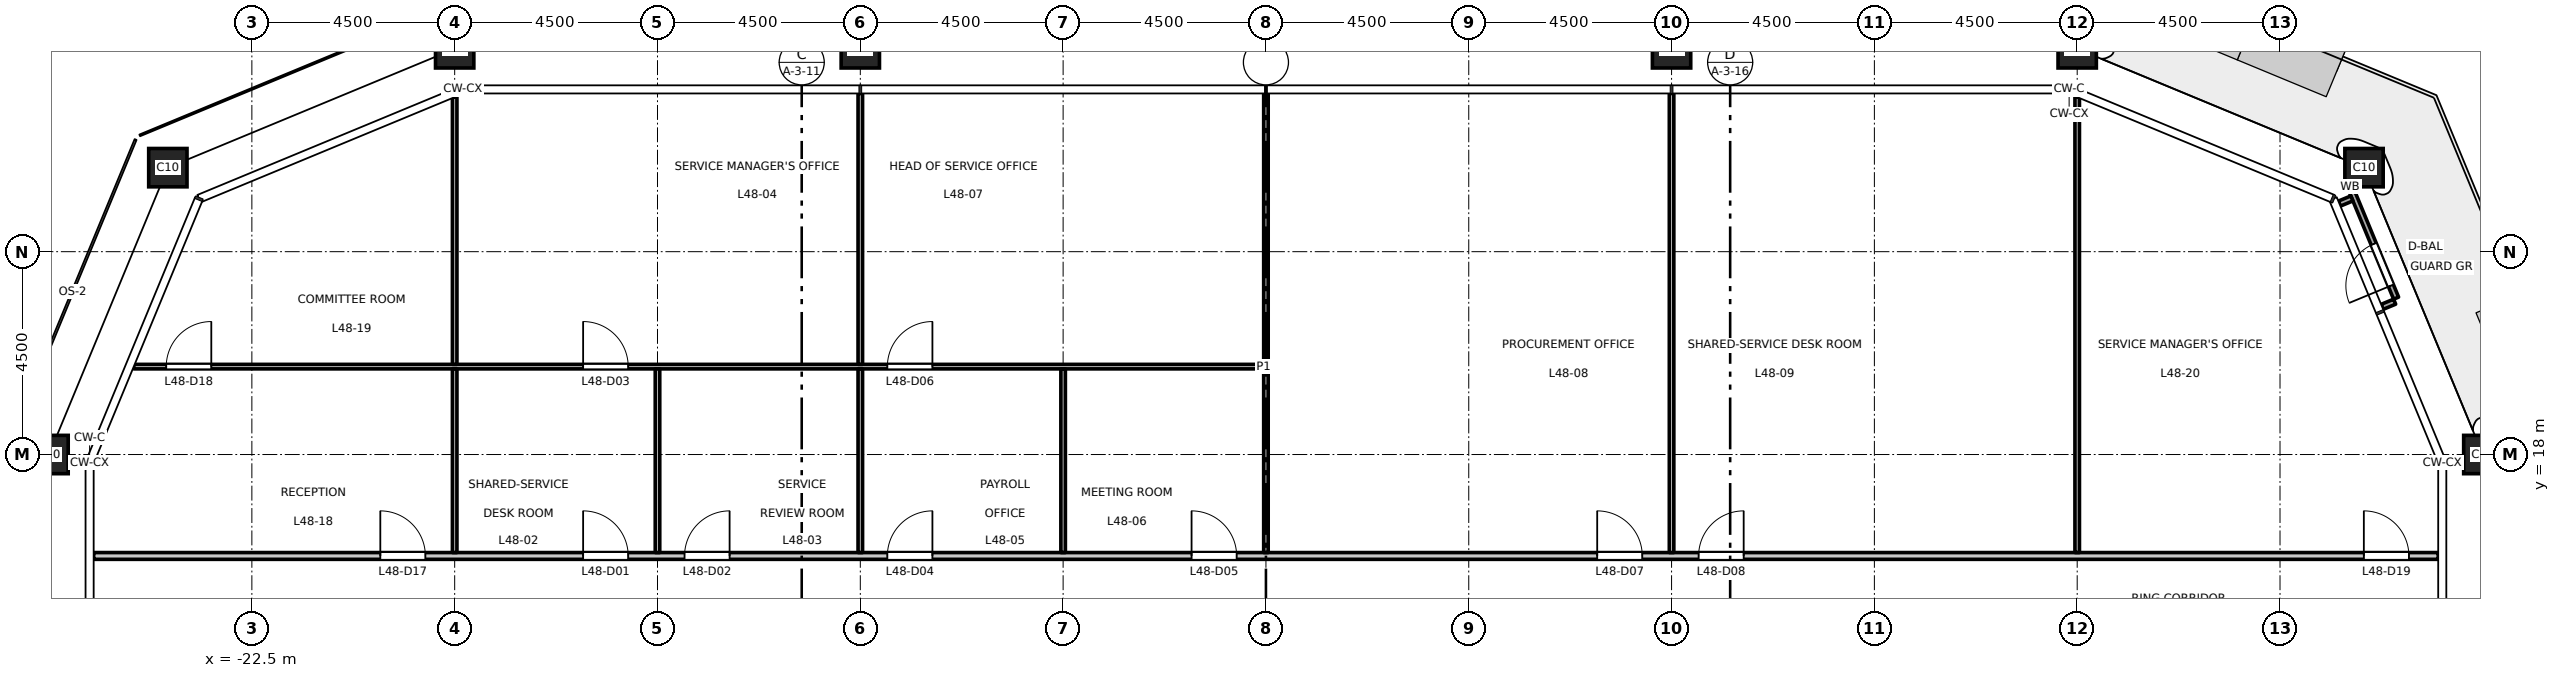
"""IFC4 building model, lengths in metres.
Left out: names, types, materials, properties, quantities, classifications, styles, units other than length and angle.
Written with IfcOpenShell. Run it as: python <this file> out.ifc"""

import sys

from ifc_helpers import new_model, si_unit, direction, frame, frame_2d, origin, origin_2d, place, context, subcontext, project, spatial, rectangle, hollow_rectangle, extrude, element, fill, save


model = new_model("IFC4")
c1 = context("Model", 3, precision=1e-05, world=origin(), true_north=direction((0.0, 1.0)))
c2 = subcontext(c1, "Body", "Model", "MODEL_VIEW")
j1 = project(units=[si_unit("LENGTHUNIT", "METRE"), si_unit("PLANEANGLEUNIT", "RADIAN")], contexts=[c1])
p1 = place(None, origin())
s1 = spatial("IfcSite", under=j1, at=p1, CompositionType="ELEMENT")
p2 = place(p1, origin())
s2 = spatial("IfcBuilding", under=s1, at=p2, CompositionType="ELEMENT")
p3 = place(p2, frame((0.0, 0.0, 224.2)))
s3 = spatial("IfcBuildingStorey", under=s2, at=p3, CompositionType="ELEMENT", Elevation=224.2)
for number, where, z_axis, x_axis in (
    (1, (27.0, 18.0, 0.0), (0.0, 0.0, 1.0), (1.0, 0.0, 0.0)),
    (2, (24.364, 24.364, 0.0), (0.0, 0.0, 1.0), (1.0, 0.0, 0.0)),
    (3, (18.0, 27.0, 0.0), (0.0, 0.0, 1.0), (1.0, 0.0, 0.0)),
    (4, (9.0, 27.0, 0.0), (0.0, 0.0, 1.0), (1.0, 0.0, 0.0)),
    (5, (0.0, 27.0, 0.0), (0.0, 0.0, 1.0), (1.0, 0.0, 0.0)),
    (6, (-9.0, 27.0, 0.0), (0.0, 0.0, 1.0), (1.0, 0.0, 0.0)),
    (7, (-18.0, 27.0, 0.0), (0.0, 0.0, 1.0), (1.0, 0.0, 0.0)),
    (8, (-24.364, 24.364, 0.0), (0.0, 0.0, 1.0), (1.0, 0.0, 0.0)),
    (9, (-27.0, 18.0, 0.0), (0.0, 0.0, 1.0), (1.0, 0.0, 0.0)),
):
    element("IfcColumn", number, at=place(p3, frame(where, z_axis=z_axis, x_axis=x_axis)), inside=s3, PredefinedType="COLUMN", context=c2, shape_type="SweptSolid", body=[
        extrude(hollow_rectangle(XDim=0.85, YDim=0.85, WallThickness=0.05, at=origin_2d()), origin(), (0.0, 0.0, 1.0), 4.5),
    ])
p4 = place(p3, frame((24.766, 21.276, 0.0), z_axis=(0.0, 0.0, 1.0), x_axis=(0.923917630863, 0.382591441855, 0.0)))
e10 = element("IfcWall", 10, at=p4, inside=s3, PredefinedType="STANDARD", context=c2, shape_type="SweptSolid", body=[
    extrude(rectangle(XDim=0.3, YDim=0.12, at=frame_2d((0.15, 0.0))), origin(), (0.0, 0.0, 1.0), 4.35),
])
p5 = place(p3, frame((23.818, 23.566, 0.0), z_axis=(0.0, 0.0, 1.0), x_axis=(0.923629715641, 0.383285987724, 0.0)))
e11 = element("IfcWall", 11, at=p5, inside=s3, PredefinedType="STANDARD", context=c2, shape_type="SweptSolid", body=[
    extrude(rectangle(XDim=0.3, YDim=0.12, at=frame_2d((0.15, 0.0))), origin(), (0.0, 0.0, 1.0), 4.35),
])
p6 = place(p3, frame((25.076, 21.469, 0.0), z_axis=(0.0, 0.0, 1.0), x_axis=(-0.382636771556, 0.923898858671, 0.0)))
e12 = element("IfcWall", 12, at=p6, inside=s3, PredefinedType="STANDARD", context=c2, shape_type="SweptSolid", body=[
    extrude(rectangle(XDim=2.673, YDim=0.12, at=frame_2d((1.337, 0.0))), origin(), (0.0, 0.0, 1.0), 4.35),
])
p7 = place(p6, frame((0.3, 0.0, 0.0)))
e13 = element("IfcOpeningElement", 13, at=p7, cuts=e12, PredefinedType="OPENING", context=c2, shape_type="SweptSolid", body=[
    extrude(rectangle(XDim=1.0, YDim=2.4, at=frame_2d((0.5, 1.2))), frame((0.0, 0.07, 0.0), z_axis=(0.0, -1.0, 0.0), x_axis=(1.0, 0.0, 0.0)), (0.0, 0.0, 1.0), 0.14),
])
p8 = place(p3, frame((-26.01, 15.75, 0.0), z_axis=(0.0, 0.0, 1.0), x_axis=(1.0, 0.0, 0.0)))
e14 = element("IfcWall", 14, at=p8, inside=s3, PredefinedType="PARTITIONING", context=c2, shape_type="SweptSolid", body=[
    extrude(rectangle(XDim=52.02, YDim=0.15, at=frame_2d((26.01, 0.0))), origin(), (0.0, 0.0, 1.0), 4.35),
])
p9 = place(p8, frame((10.86, 0.0, 0.0)))
e15 = element("IfcOpeningElement", 15, at=p9, cuts=e14, PredefinedType="OPENING", context=c2, shape_type="SweptSolid", body=[
    extrude(rectangle(XDim=1.0, YDim=2.1, at=frame_2d((0.5, 1.05))), frame((0.0, 0.085, 0.0), z_axis=(0.0, -1.0, 0.0), x_axis=(1.0, 0.0, 0.0)), (0.0, 0.0, 1.0), 0.17),
])
p10 = place(p8, frame((13.11, 0.0, 0.0)))
e16 = element("IfcOpeningElement", 16, at=p10, cuts=e14, PredefinedType="OPENING", context=c2, shape_type="SweptSolid", body=[
    extrude(rectangle(XDim=1.0, YDim=2.1, at=frame_2d((0.5, 1.05))), frame((0.0, 0.085, 0.0), z_axis=(0.0, -1.0, 0.0), x_axis=(1.0, 0.0, 0.0)), (0.0, 0.0, 1.0), 0.17),
])
p11 = place(p8, frame((17.61, 0.0, 0.0)))
e17 = element("IfcOpeningElement", 17, at=p11, cuts=e14, PredefinedType="OPENING", context=c2, shape_type="SweptSolid", body=[
    extrude(rectangle(XDim=1.0, YDim=2.1, at=frame_2d((0.5, 1.05))), frame((0.0, 0.085, 0.0), z_axis=(0.0, -1.0, 0.0), x_axis=(1.0, 0.0, 0.0)), (0.0, 0.0, 1.0), 0.17),
])
p12 = place(p8, frame((24.36, 0.0, 0.0)))
e18 = element("IfcOpeningElement", 18, at=p12, cuts=e14, PredefinedType="OPENING", context=c2, shape_type="SweptSolid", body=[
    extrude(rectangle(XDim=1.0, YDim=2.1, at=frame_2d((0.5, 1.05))), frame((0.0, 0.085, 0.0), z_axis=(0.0, -1.0, 0.0), x_axis=(1.0, 0.0, 0.0)), (0.0, 0.0, 1.0), 0.17),
])
p13 = place(p8, frame((33.36, 0.0, 0.0)))
e19 = element("IfcOpeningElement", 19, at=p13, cuts=e14, PredefinedType="OPENING", context=c2, shape_type="SweptSolid", body=[
    extrude(rectangle(XDim=1.0, YDim=2.1, at=frame_2d((0.5, 1.05))), frame((0.0, 0.085, 0.0), z_axis=(0.0, -1.0, 0.0), x_axis=(1.0, 0.0, 0.0)), (0.0, 0.0, 1.0), 0.17),
])
p14 = place(p8, frame((35.61, 0.0, 0.0)))
e20 = element("IfcOpeningElement", 20, at=p14, cuts=e14, PredefinedType="OPENING", context=c2, shape_type="SweptSolid", body=[
    extrude(rectangle(XDim=1.0, YDim=2.1, at=frame_2d((0.5, 1.05))), frame((0.0, 0.085, 0.0), z_axis=(0.0, -1.0, 0.0), x_axis=(1.0, 0.0, 0.0)), (0.0, 0.0, 1.0), 0.17),
])
p15 = place(p8, frame((6.36, 0.0, 0.0)))
e21 = element("IfcOpeningElement", 21, at=p15, cuts=e14, PredefinedType="OPENING", context=c2, shape_type="SweptSolid", body=[
    extrude(rectangle(XDim=1.0, YDim=2.1, at=frame_2d((0.5, 1.05))), frame((0.0, 0.085, 0.0), z_axis=(0.0, -1.0, 0.0), x_axis=(1.0, 0.0, 0.0)), (0.0, 0.0, 1.0), 0.17),
])
p16 = place(p8, frame((50.37, 0.0, 0.0)))
e22 = element("IfcOpeningElement", 22, at=p16, cuts=e14, PredefinedType="OPENING", context=c2, shape_type="SweptSolid", body=[
    extrude(rectangle(XDim=1.0, YDim=2.1, at=frame_2d((0.5, 1.05))), frame((0.0, 0.085, 0.0), z_axis=(0.0, -1.0, 0.0), x_axis=(1.0, 0.0, 0.0)), (0.0, 0.0, 1.0), 0.17),
])
p17 = place(p3, frame((-25.121, 19.95, 0.0), z_axis=(0.0, 0.0, 1.0), x_axis=(1.0, 0.0, 0.0)))
e23 = element("IfcWall", 23, at=p17, inside=s3, PredefinedType="PARTITIONING", context=c2, shape_type="SweptSolid", body=[
    extrude(rectangle(XDim=25.071, YDim=0.1, at=frame_2d((12.536, 0.0))), origin(), (0.0, 0.0, 1.0), 4.35),
])
p18 = place(p17, frame((9.971, 0.0, 0.0)))
e24 = element("IfcOpeningElement", 24, at=p18, cuts=e23, PredefinedType="OPENING", context=c2, shape_type="SweptSolid", body=[
    extrude(rectangle(XDim=1.0, YDim=2.1, at=frame_2d((0.5, 1.05))), frame((0.0, 0.06, 0.0), z_axis=(0.0, -1.0, 0.0), x_axis=(1.0, 0.0, 0.0)), (0.0, 0.0, 1.0), 0.12),
])
p19 = place(p17, frame((16.721, 0.0, 0.0)))
e25 = element("IfcOpeningElement", 25, at=p19, cuts=e23, PredefinedType="OPENING", context=c2, shape_type="SweptSolid", body=[
    extrude(rectangle(XDim=1.0, YDim=2.1, at=frame_2d((0.5, 1.05))), frame((0.0, 0.06, 0.0), z_axis=(0.0, -1.0, 0.0), x_axis=(1.0, 0.0, 0.0)), (0.0, 0.0, 1.0), 0.12),
])
p20 = place(p17, frame((0.721, 0.0, 0.0)))
e26 = element("IfcOpeningElement", 26, at=p20, cuts=e23, PredefinedType="OPENING", context=c2, shape_type="SweptSolid", body=[
    extrude(rectangle(XDim=1.0, YDim=2.1, at=frame_2d((0.5, 1.05))), frame((0.0, 0.06, 0.0), z_axis=(0.0, -1.0, 0.0), x_axis=(1.0, 0.0, 0.0)), (0.0, 0.0, 1.0), 0.12),
])
p21 = place(p3, frame((-18.0, 15.825, 0.0), z_axis=(0.0, 0.0, 1.0), x_axis=(0.0, 1.0, 0.0)))
e27 = element("IfcWall", 27, at=p21, inside=s3, PredefinedType="PARTITIONING", context=c2, shape_type="SweptSolid", body=[
    extrude(rectangle(XDim=4.075, YDim=0.1, at=frame_2d((2.038, 0.0))), origin(), (0.0, 0.0, 1.0), 3.65),
])
p22 = place(p3, frame((-18.0, 20.0, 0.0), z_axis=(0.0, 0.0, 1.0), x_axis=(0.0, 1.0, 0.0)))
e28 = element("IfcWall", 28, at=p22, inside=s3, PredefinedType="PARTITIONING", context=c2, shape_type="SweptSolid", body=[
    extrude(rectangle(XDim=5.928, YDim=0.1, at=frame_2d((2.964, 0.0))), origin(), (0.0, 0.0, 1.0), 3.65),
])
p23 = place(p3, frame((-13.5, 15.825, 0.0), z_axis=(0.0, 0.0, 1.0), x_axis=(0.0, 1.0, 0.0)))
e29 = element("IfcWall", 29, at=p23, inside=s3, PredefinedType="PARTITIONING", context=c2, shape_type="SweptSolid", body=[
    extrude(rectangle(XDim=4.075, YDim=0.1, at=frame_2d((2.038, 0.0))), origin(), (0.0, 0.0, 1.0), 4.35),
])
p24 = place(p3, frame((-9.0, 15.825, 0.0), z_axis=(0.0, 0.0, 1.0), x_axis=(0.0, 1.0, 0.0)))
e30 = element("IfcWall", 30, at=p24, inside=s3, PredefinedType="PARTITIONING", context=c2, shape_type="SweptSolid", body=[
    extrude(rectangle(XDim=4.075, YDim=0.1, at=frame_2d((2.038, 0.0))), origin(), (0.0, 0.0, 1.0), 3.65),
])
p25 = place(p3, frame((-9.0, 20.0, 0.0), z_axis=(0.0, 0.0, 1.0), x_axis=(0.0, 1.0, 0.0)))
e31 = element("IfcWall", 31, at=p25, inside=s3, PredefinedType="PARTITIONING", context=c2, shape_type="SweptSolid", body=[
    extrude(rectangle(XDim=6.01, YDim=0.1, at=frame_2d((3.005, 0.0))), origin(), (0.0, 0.0, 1.0), 3.65),
])
p26 = place(p3, frame((-4.5, 15.825, 0.0), z_axis=(0.0, 0.0, 1.0), x_axis=(0.0, 1.0, 0.0)))
e32 = element("IfcWall", 32, at=p26, inside=s3, PredefinedType="PARTITIONING", context=c2, shape_type="SweptSolid", body=[
    extrude(rectangle(XDim=4.075, YDim=0.1, at=frame_2d((2.038, 0.0))), origin(), (0.0, 0.0, 1.0), 4.35),
])
p27 = place(p3, frame((0.0, 15.825, 0.0), z_axis=(0.0, 0.0, 1.0), x_axis=(0.0, 1.0, 0.0)))
e33 = element("IfcWall", 33, at=p27, inside=s3, PredefinedType="PARTITIONING", context=c2, shape_type="SweptSolid", body=[
    extrude(rectangle(XDim=10.185, YDim=0.1, at=frame_2d((5.093, 0.0))), origin(), (0.0, 0.0, 1.0), 3.55),
])
p28 = place(p3, frame((9.0, 15.825, 0.0), z_axis=(0.0, 0.0, 1.0), x_axis=(0.0, 1.0, 0.0)))
e34 = element("IfcWall", 34, at=p28, inside=s3, PredefinedType="PARTITIONING", context=c2, shape_type="SweptSolid", body=[
    extrude(rectangle(XDim=10.185, YDim=0.1, at=frame_2d((5.093, 0.0))), origin(), (0.0, 0.0, 1.0), 3.65),
])
p29 = place(p3, frame((18.0, 15.825, 0.0), z_axis=(0.0, 0.0, 1.0), x_axis=(0.0, 1.0, 0.0)))
e35 = element("IfcWall", 35, at=p29, inside=s3, PredefinedType="PARTITIONING", context=c2, shape_type="SweptSolid", body=[
    extrude(rectangle(XDim=10.103, YDim=0.1, at=frame_2d((5.052, 0.0))), origin(), (0.0, 0.0, 1.0), 3.65),
])
p30 = place(p7, origin())
e36 = element("IfcDoor", 36, at=p30, inside=s3, OperationType="SINGLE_SWING_LEFT", PredefinedType="DOOR", context=c2, shape_type="SweptSolid", body=[
    extrude(rectangle(XDim=1.0, YDim=2.4, at=frame_2d((0.5, 1.2))), frame((0.0, 0.025, 0.0), z_axis=(0.0, -1.0, 0.0), x_axis=(1.0, 0.0, 0.0)), (0.0, 0.0, 1.0), 0.05),
])
fill(e13, e36)
p31 = place(p9, origin())
e37 = element("IfcDoor", 37, at=p31, inside=s3, OperationType="SINGLE_SWING_LEFT", PredefinedType="DOOR", context=c2, shape_type="SweptSolid", body=[
    extrude(rectangle(XDim=1.0, YDim=2.1, at=frame_2d((0.5, 1.05))), frame((0.0, 0.025, 0.0), z_axis=(0.0, -1.0, 0.0), x_axis=(1.0, 0.0, 0.0)), (0.0, 0.0, 1.0), 0.05),
])
fill(e15, e37)
p32 = place(p10, origin())
e38 = element("IfcDoor", 38, at=p32, inside=s3, OperationType="SINGLE_SWING_RIGHT", PredefinedType="DOOR", context=c2, shape_type="SweptSolid", body=[
    extrude(rectangle(XDim=1.0, YDim=2.1, at=frame_2d((0.5, 1.05))), frame((0.0, 0.025, 0.0), z_axis=(0.0, -1.0, 0.0), x_axis=(1.0, 0.0, 0.0)), (0.0, 0.0, 1.0), 0.05),
])
fill(e16, e38)
p33 = place(p18, origin())
e39 = element("IfcDoor", 39, at=p33, inside=s3, OperationType="SINGLE_SWING_LEFT", PredefinedType="DOOR", context=c2, shape_type="SweptSolid", body=[
    extrude(rectangle(XDim=1.0, YDim=2.1, at=frame_2d((0.5, 1.05))), frame((0.0, 0.025, 0.0), z_axis=(0.0, -1.0, 0.0), x_axis=(1.0, 0.0, 0.0)), (0.0, 0.0, 1.0), 0.05),
])
fill(e24, e39)
p34 = place(p11, origin())
e40 = element("IfcDoor", 40, at=p34, inside=s3, OperationType="SINGLE_SWING_RIGHT", PredefinedType="DOOR", context=c2, shape_type="SweptSolid", body=[
    extrude(rectangle(XDim=1.0, YDim=2.1, at=frame_2d((0.5, 1.05))), frame((0.0, 0.025, 0.0), z_axis=(0.0, -1.0, 0.0), x_axis=(1.0, 0.0, 0.0)), (0.0, 0.0, 1.0), 0.05),
])
fill(e17, e40)
p35 = place(p12, origin())
e41 = element("IfcDoor", 41, at=p35, inside=s3, OperationType="SINGLE_SWING_LEFT", PredefinedType="DOOR", context=c2, shape_type="SweptSolid", body=[
    extrude(rectangle(XDim=1.0, YDim=2.1, at=frame_2d((0.5, 1.05))), frame((0.0, 0.025, 0.0), z_axis=(0.0, -1.0, 0.0), x_axis=(1.0, 0.0, 0.0)), (0.0, 0.0, 1.0), 0.05),
])
fill(e18, e41)
p36 = place(p19, origin())
e42 = element("IfcDoor", 42, at=p36, inside=s3, OperationType="SINGLE_SWING_RIGHT", PredefinedType="DOOR", context=c2, shape_type="SweptSolid", body=[
    extrude(rectangle(XDim=1.0, YDim=2.1, at=frame_2d((0.5, 1.05))), frame((0.0, 0.025, 0.0), z_axis=(0.0, -1.0, 0.0), x_axis=(1.0, 0.0, 0.0)), (0.0, 0.0, 1.0), 0.05),
])
fill(e25, e42)
p37 = place(p13, origin())
e43 = element("IfcDoor", 43, at=p37, inside=s3, OperationType="SINGLE_SWING_LEFT", PredefinedType="DOOR", context=c2, shape_type="SweptSolid", body=[
    extrude(rectangle(XDim=1.0, YDim=2.1, at=frame_2d((0.5, 1.05))), frame((0.0, 0.025, 0.0), z_axis=(0.0, -1.0, 0.0), x_axis=(1.0, 0.0, 0.0)), (0.0, 0.0, 1.0), 0.05),
])
fill(e19, e43)
p38 = place(p14, origin())
e44 = element("IfcDoor", 44, at=p38, inside=s3, OperationType="SINGLE_SWING_RIGHT", PredefinedType="DOOR", context=c2, shape_type="SweptSolid", body=[
    extrude(rectangle(XDim=1.0, YDim=2.1, at=frame_2d((0.5, 1.05))), frame((0.0, 0.025, 0.0), z_axis=(0.0, -1.0, 0.0), x_axis=(1.0, 0.0, 0.0)), (0.0, 0.0, 1.0), 0.05),
])
fill(e20, e44)
p39 = place(p15, origin())
e45 = element("IfcDoor", 45, at=p39, inside=s3, OperationType="SINGLE_SWING_LEFT", PredefinedType="DOOR", context=c2, shape_type="SweptSolid", body=[
    extrude(rectangle(XDim=1.0, YDim=2.1, at=frame_2d((0.5, 1.05))), frame((0.0, 0.025, 0.0), z_axis=(0.0, -1.0, 0.0), x_axis=(1.0, 0.0, 0.0)), (0.0, 0.0, 1.0), 0.05),
])
fill(e21, e45)
p40 = place(p20, origin())
e46 = element("IfcDoor", 46, at=p40, inside=s3, OperationType="SINGLE_SWING_RIGHT", PredefinedType="DOOR", context=c2, shape_type="SweptSolid", body=[
    extrude(rectangle(XDim=1.0, YDim=2.1, at=frame_2d((0.5, 1.05))), frame((0.0, 0.025, 0.0), z_axis=(0.0, -1.0, 0.0), x_axis=(1.0, 0.0, 0.0)), (0.0, 0.0, 1.0), 0.05),
])
fill(e26, e46)
p41 = place(p16, origin())
e47 = element("IfcDoor", 47, at=p41, inside=s3, OperationType="SINGLE_SWING_LEFT", PredefinedType="DOOR", context=c2, shape_type="SweptSolid", body=[
    extrude(rectangle(XDim=1.0, YDim=2.1, at=frame_2d((0.5, 1.05))), frame((0.0, 0.025, 0.0), z_axis=(0.0, -1.0, 0.0), x_axis=(1.0, 0.0, 0.0)), (0.0, 0.0, 1.0), 0.05),
])
fill(e22, e47)
save(model, sys.argv[1])
